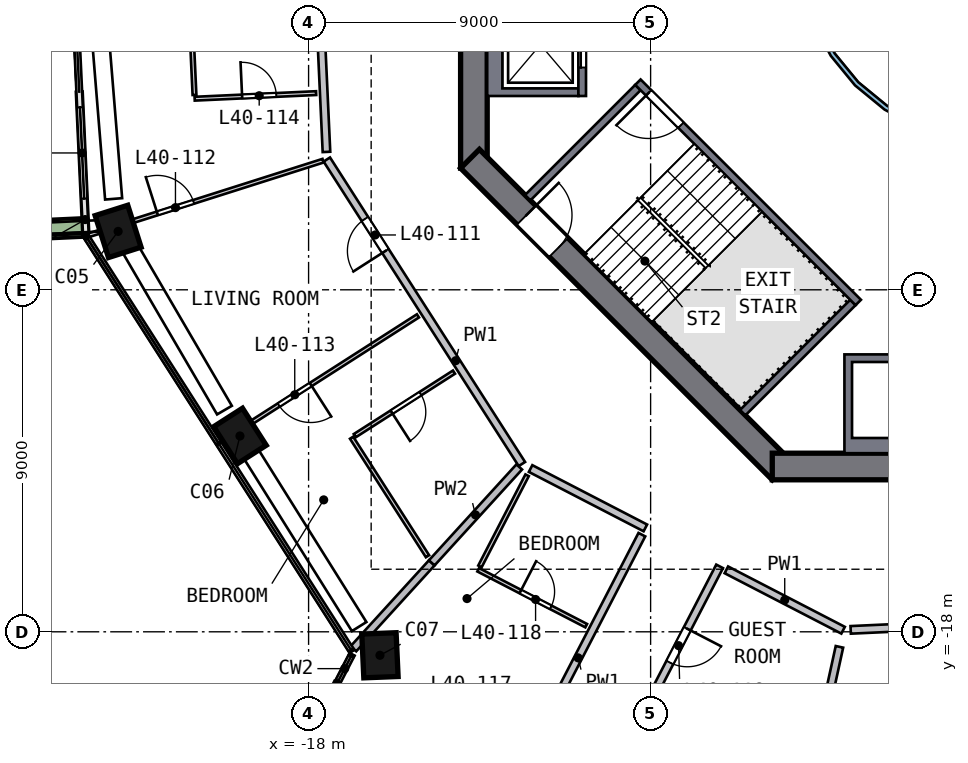
"""IFC4 building model, lengths in metres.
Left out: names, types, materials, properties, quantities, classifications, styles, units other than length and angle.
Written with IfcOpenShell. Run it as: python <this file> out.ifc"""

import sys

from ifc_helpers import new_model, si_unit, direction, frame, frame_2d, origin, origin_2d, place, context, subcontext, project, spatial, polyline, rectangle, outline, extrude, element, fill, save


model = new_model("IFC4")
c1 = context("Model", 3, precision=1e-05, world=origin(), true_north=direction((0.0, 1.0)))
c2 = subcontext(c1, "Body", "Model", "MODEL_VIEW")
j1 = project(units=[si_unit("LENGTHUNIT", "METRE"), si_unit("PLANEANGLEUNIT", "RADIAN")], contexts=[c1])
p1 = place(None, origin())
s1 = spatial("IfcSite", under=j1, at=p1, CompositionType="ELEMENT")
p2 = place(p1, origin())
s2 = spatial("IfcBuilding", under=s1, at=p2, CompositionType="ELEMENT")
p3 = place(p2, frame((0.0, 0.0, 165.5)))
s3 = spatial("IfcBuildingStorey", under=s2, at=p3, CompositionType="ELEMENT", Elevation=165.5)
p4 = place(p3, frame((-23.055, -7.331, 0.0), z_axis=(0.035812192, -0.109295901, 0.993363928), x_axis=(-0.301282406, 0.946573687, 0.115009418)))
e1 = element("IfcColumn", 1, at=p4, inside=s3, PredefinedType="COLUMN", context=c2, shape_type="SweptSolid", body=[
    extrude(rectangle(XDim=1.15, YDim=0.9, at=origin_2d()), origin(), (0.0, 0.0, 1.0), 3.02),
])
p5 = place(p3, frame((-19.88, -12.733, 0.0), z_axis=(0.061296279, -0.094046929, 0.993678993), x_axis=(0.535491613, -0.837046934, -0.112254901)))
e2 = element("IfcColumn", 2, at=p5, inside=s3, PredefinedType="COLUMN", context=c2, shape_type="SweptSolid", body=[
    extrude(rectangle(XDim=1.15, YDim=0.9, at=origin_2d()), origin(), (0.0, 0.0, 1.0), 3.019),
])
p6 = place(p3, frame((-16.229, -18.525, 0.0), z_axis=(0.088740358, -0.076455719, 0.993116142), x_axis=(-0.038931271, 0.996021602, 0.080158119)))
e3 = element("IfcColumn", 3, at=p6, inside=s3, PredefinedType="COLUMN", context=c2, shape_type="SweptSolid", body=[
    extrude(rectangle(XDim=1.15, YDim=0.9, at=origin_2d()), origin(), (0.0, 0.0, 1.0), 3.021),
])
p7 = place(p3, frame((-13.65, 5.799, 0.0), z_axis=(0.0, 0.0, 1.0), x_axis=(0.0, -1.0, 0.0)))
e4 = element("IfcWall", 4, at=p7, inside=s3, PredefinedType="SHEAR", context=c2, shape_type="SweptSolid", body=[
    extrude(rectangle(XDim=11.598, YDim=0.7, at=frame_2d((5.799, 0.0))), origin(), (0.0, 0.0, 1.0), 3.5),
])
p8 = place(p7, frame((4.899, 0.0, 0.0)))
e5 = element("IfcOpeningElement", 5, at=p8, cuts=e4, PredefinedType="OPENING", context=c2, shape_type="SweptSolid", body=[
    extrude(rectangle(XDim=1.8, YDim=2.1, at=frame_2d((0.9, 1.05))), frame((0.0, 0.36, 0.0), z_axis=(0.0, -1.0, 0.0), x_axis=(1.0, 0.0, 0.0)), (0.0, 0.0, 1.0), 0.72),
])
p9 = place(p3, frame((-13.752, -5.552, 0.0), z_axis=(0.0, 0.0, 1.0), x_axis=(0.707106781, -0.707106781, 0.0)))
e6 = element("IfcWall", 6, at=p9, inside=s3, PredefinedType="SHEAR", context=c2, shape_type="SweptSolid", body=[
    extrude(rectangle(XDim=11.598, YDim=0.7, at=frame_2d((5.799, 0.0))), origin(), (0.0, 0.0, 1.0), 3.5),
])
p10 = place(p9, frame((2.099, 0.0, 0.0)))
e7 = element("IfcOpeningElement", 7, at=p10, cuts=e6, PredefinedType="OPENING", context=c2, shape_type="SweptSolid", body=[
    extrude(rectangle(XDim=1.2, YDim=2.1, at=frame_2d((0.6, 1.05))), frame((0.0, 0.36, 0.0), z_axis=(0.0, -1.0, 0.0), x_axis=(1.0, 0.0, 0.0)), (0.0, 0.0, 1.0), 0.72),
])
p11 = place(p3, frame((-5.799, -13.65, 0.0), z_axis=(0.0, 0.0, 1.0), x_axis=(1.0, 0.0, 0.0)))
e8 = element("IfcWall", 8, at=p11, inside=s3, PredefinedType="SHEAR", context=c2, shape_type="SweptSolid", body=[
    extrude(rectangle(XDim=11.598, YDim=0.7, at=frame_2d((5.799, 0.0))), origin(), (0.0, 0.0, 1.0), 3.5),
])
p12 = place(p11, frame((4.899, 0.0, 0.0)))
e9 = element("IfcOpeningElement", 9, at=p12, cuts=e8, PredefinedType="OPENING", context=c2, shape_type="SweptSolid", body=[
    extrude(rectangle(XDim=1.8, YDim=2.1, at=frame_2d((0.9, 1.05))), frame((0.0, 0.36, 0.0), z_axis=(0.0, -1.0, 0.0), x_axis=(1.0, 0.0, 0.0)), (0.0, 0.0, 1.0), 0.72),
])
p13 = place(p3, frame((-17.347, -19.379, 0.0), z_axis=(0.0, 0.0, 1.0), x_axis=(0.888116855, -0.459617724, 0.0)))
e10 = element("IfcWall", 10, at=p13, inside=s3, PredefinedType="SOLIDWALL", context=c2, shape_type="SweptSolid", body=[
    extrude(rectangle(XDim=1.875, YDim=0.15, at=frame_2d((0.938, 0.0))), origin(), (0.0, 0.0, 1.0), 3.0),
])
p14 = place(p3, frame((-24.034, -3.801, 0.0), z_axis=(0.0, 0.0, 1.0), x_axis=(0.046064357, -0.998938474, 0.0)))
e11 = element("IfcWall", 11, at=p14, inside=s3, PredefinedType="SOLIDWALL", context=c2, shape_type="SweptSolid", body=[
    extrude(rectangle(XDim=3.71, YDim=0.15, at=frame_2d((1.855, 0.0))), origin(), (0.0, 0.0, 1.0), 2.935),
])
p15 = place(p14, frame((0.4, 0.0, 0.0)))
e12 = element("IfcOpeningElement", 12, at=p15, cuts=e11, PredefinedType="OPENING", context=c2, shape_type="SweptSolid", body=[
    extrude(rectangle(XDim=2.4, YDim=2.4, at=frame_2d((1.2, 1.2))), frame((0.0, 0.085, 0.0), z_axis=(0.0, -1.0, 0.0), x_axis=(1.0, 0.0, 0.0)), (0.0, 0.0, 1.0), 0.17),
])
p16 = place(p3, frame((-26.642, -7.485, 0.0), z_axis=(0.0, 0.0, 1.0), x_axis=(0.998939428, 0.046043663, 0.0)))
e13 = element("IfcWall", 13, at=p16, inside=s3, PredefinedType="SOLIDWALL", context=c2, shape_type="SweptSolid", body=[
    extrude(rectangle(XDim=2.699, YDim=0.5, at=frame_2d((1.35, 0.0))), origin(), (0.0, 0.0, 1.0), 0.7),
])
p17 = place(p3, origin())
e14 = element("IfcWall", 14, at=p17, inside=s3, PredefinedType="SOLIDWALL", context=c2, shape_type="SweptSolid", body=[
    extrude(outline(polyline([(-13.3, -3.9), (-13.3, -1.2), (-10.9, -1.2), (-10.9, -1.4), (-12.9, -1.4), (-12.9, -3.7), (-10.9, -3.7), (-10.9, -3.9), (-13.3, -3.9)])), origin(), (0.0, 0.0, 1.0), 3.0),
])
p18 = place(p3, frame((-10.8, -1.2, 0.0), z_axis=(0.0, 0.0, 1.0), x_axis=(0.0, -1.0, 0.0)))
e15 = element("IfcWall", 15, at=p18, inside=s3, PredefinedType="SOLIDWALL", context=c2, shape_type="SweptSolid", body=[
    extrude(rectangle(XDim=2.7, YDim=0.2, at=frame_2d((1.35, 0.0))), origin(), (0.0, 0.0, 1.0), 3.0),
])
p19 = place(p18, frame((0.75, 0.0, 0.0)))
e16 = element("IfcOpeningElement", 16, at=p19, cuts=e15, PredefinedType="OPENING", context=c2, shape_type="SweptSolid", body=[
    extrude(rectangle(XDim=1.2, YDim=2.1, at=frame_2d((0.6, 1.05))), frame((0.0, 0.11, 0.0), z_axis=(0.0, -1.0, 0.0), x_axis=(1.0, 0.0, 0.0)), (0.0, 0.0, 1.0), 0.22),
])
p20 = place(p3, origin())
e17 = element("IfcWall", 17, at=p20, inside=s3, PredefinedType="SOLIDWALL", context=c2, shape_type="SweptSolid", body=[
    extrude(outline(polyline([(-1.2, -13.3), (-3.9, -13.3), (-3.9, -10.7), (-1.2, -10.7), (-1.2, -13.3)]), holes=[polyline([(-3.7, -10.9), (-3.7, -12.9), (-1.4, -12.9), (-1.4, -10.9), (-3.7, -10.9)])]), origin(), (0.0, 0.0, 1.0), 3.0),
])
p21 = place(p3, frame((-3.535, -9.334, 0.0), z_axis=(0.0, 0.0, 1.0), x_axis=(-0.707106781, 0.707106781, 0.0)))
e18 = element("IfcWall", 18, at=p21, inside=s3, PredefinedType="SOLIDWALL", context=c2, shape_type="SweptSolid", body=[
    extrude(rectangle(XDim=8.2, YDim=0.2, at=frame_2d((4.1, 0.0))), origin(), (0.0, 0.0, 1.0), 3.0),
])
p22 = place(p21, frame((6.6, 0.0, 0.0)))
e19 = element("IfcOpeningElement", 19, at=p22, cuts=e18, PredefinedType="OPENING", context=c2, shape_type="SweptSolid", body=[
    extrude(rectangle(XDim=1.2, YDim=2.1, at=frame_2d((0.6, 1.05))), frame((0.0, 0.11, 0.0), z_axis=(0.0, -1.0, 0.0), x_axis=(1.0, 0.0, 0.0)), (0.0, 0.0, 1.0), 0.22),
])
for number, where, z_axis, x_axis in (
    (20, (-9.334, -3.677, 0.0), (0.0, 0.0, 1.0), (-0.707, -0.707, 0.0)),
    (21, (-3.677, -9.334, 0.0), (0.0, 0.0, 1.0), (-0.707, -0.707, 0.0)),
):
    element("IfcWall", number, at=place(p3, frame(where, z_axis=z_axis, x_axis=x_axis)), inside=s3, PredefinedType="SOLIDWALL", context=c2, shape_type="SweptSolid", body=[
        extrude(rectangle(XDim=4.1, YDim=0.2, at=frame_2d((2.05, 0.0))), origin(), (0.0, 0.0, 1.0), 3.0),
    ])
p23 = place(p3, origin())
e22 = element("IfcWall", 22, at=p23, inside=s3, PredefinedType="SOLIDWALL", context=c2, shape_type="SweptSolid", body=[
    extrude(outline(polyline([(5.021, -0.999), (4.73, -1.959), (4.257, -2.844), (3.62, -3.62), (2.844, -4.257), (1.959, -4.73), (0.999, -5.021), (0.0, -5.12), (-0.999, -5.021), (-1.959, -4.73), (-2.844, -4.257), (-3.62, -3.62), (-4.257, -2.844), (-4.73, -1.959), (-5.021, -0.999), (-5.12, 0.0), (-5.021, 0.999), (-4.73, 1.959), (-4.257, 2.844), (-3.62, 3.62), (-2.844, 4.257), (-1.959, 4.73), (-0.999, 5.021), (0.0, 5.12), (0.999, 5.021), (1.959, 4.73), (2.844, 4.257), (3.62, 3.62), (4.257, 2.844), (4.73, 1.959), (5.021, 0.999), (5.12, 0.0), (5.021, -0.999)]), holes=[polyline([(4.904, 0.976), (4.619, 1.913), (4.157, 2.778), (3.535, 3.535), (2.778, 4.157), (1.913, 4.619), (0.976, 4.904), (0.0, 5.0), (-0.976, 4.904), (-1.913, 4.619), (-2.778, 4.157), (-3.535, 3.535), (-4.157, 2.778), (-4.619, 1.913), (-4.904, 0.976), (-5.0, 0.0), (-4.904, -0.976), (-4.619, -1.913), (-4.157, -2.778), (-3.535, -3.535), (-2.778, -4.157), (-1.913, -4.619), (-0.976, -4.904), (0.0, -5.0), (0.976, -4.904), (1.913, -4.619), (2.778, -4.157), (3.535, -3.535), (4.157, -2.778), (4.619, -1.913), (4.904, -0.976), (5.0, 0.0), (4.904, 0.976)])]), origin(), (0.0, 0.0, 1.0), 3.0),
])
p24 = place(p3, frame((-17.949, 3.736, 0.0), z_axis=(0.0, 0.0, 1.0), x_axis=(0.046061188, -0.99893862, 0.0)))
e23 = element("IfcWall", 23, at=p24, inside=s3, PredefinedType="SOLIDWALL", context=c2, shape_type="SweptSolid", body=[
    extrude(rectangle(XDim=9.117, YDim=0.2, at=frame_2d((4.558, 0.0))), origin(), (0.0, 0.0, 1.0), 3.0),
])
p25 = place(p3, frame((-12.387, -13.585, 0.0), z_axis=(0.0, 0.0, 1.0), x_axis=(-0.539356505, 0.842077526, 0.0)))
e24 = element("IfcWall", 24, at=p25, inside=s3, PredefinedType="SOLIDWALL", context=c2, shape_type="SweptSolid", body=[
    extrude(rectangle(XDim=9.517, YDim=0.2, at=frame_2d((4.758, 0.0))), origin(), (0.0, 0.0, 1.0), 3.0),
])
p26 = place(p25, frame((6.658, 0.0, 0.0)))
e25 = element("IfcOpeningElement", 25, at=p26, cuts=e24, PredefinedType="OPENING", context=c2, shape_type="SweptSolid", body=[
    extrude(rectangle(XDim=1.0, YDim=2.1, at=frame_2d((0.5, 1.05))), frame((0.0, 0.11, 0.0), z_axis=(0.0, -1.0, 0.0), x_axis=(1.0, 0.0, 0.0)), (0.0, 0.0, 1.0), 0.22),
])
p27 = place(p3, frame((-9.23, -15.444, 0.0), z_axis=(0.0, 0.0, 1.0), x_axis=(-0.45958486, -0.888133862, 0.0)))
e26 = element("IfcWall", 26, at=p27, inside=s3, PredefinedType="SOLIDWALL", context=c2, shape_type="SweptSolid", body=[
    extrude(rectangle(XDim=7.3, YDim=0.2, at=frame_2d((3.65, 0.0))), origin(), (0.0, 0.0, 1.0), 3.0),
])
p28 = place(p3, frame((-12.158, -13.704, 0.0), z_axis=(0.0, 0.0, 1.0), x_axis=(0.888122651, -0.459606524, 0.0)))
e27 = element("IfcWall", 27, at=p28, inside=s3, PredefinedType="SOLIDWALL", context=c2, shape_type="SweptSolid", body=[
    extrude(rectangle(XDim=3.4, YDim=0.2, at=frame_2d((1.7, 0.0))), origin(), (0.0, 0.0, 1.0), 3.0),
])
p29 = place(p3, frame((-7.184, -16.277, 0.0), z_axis=(0.0, 0.0, 1.0), x_axis=(-0.459592049, -0.888130142, 0.0)))
e28 = element("IfcWall", 28, at=p29, inside=s3, PredefinedType="SOLIDWALL", context=c2, shape_type="SweptSolid", body=[
    extrude(rectangle(XDim=7.5, YDim=0.2, at=frame_2d((3.75, 0.0))), origin(), (0.0, 0.0, 1.0), 3.0),
])
p30 = place(p29, frame((1.85, 0.0, 0.0)))
e29 = element("IfcOpeningElement", 29, at=p30, cuts=e28, PredefinedType="OPENING", context=c2, shape_type="SweptSolid", body=[
    extrude(rectangle(XDim=1.0, YDim=2.1, at=frame_2d((0.5, 1.05))), frame((0.0, 0.11, 0.0), z_axis=(0.0, -1.0, 0.0), x_axis=(1.0, 0.0, 0.0)), (0.0, 0.0, 1.0), 0.22),
])
p31 = place(p3, frame((-7.007, -16.369, 0.0), z_axis=(0.0, 0.0, 1.0), x_axis=(0.88814313, -0.459566948, 0.0)))
e30 = element("IfcWall", 30, at=p31, inside=s3, PredefinedType="SOLIDWALL", context=c2, shape_type="SweptSolid", body=[
    extrude(rectangle(XDim=3.458, YDim=0.2, at=frame_2d((1.729, 0.0))), origin(), (0.0, 0.0, 1.0), 3.0),
])
p32 = place(p3, frame((5.571, -17.52, 0.0), z_axis=(0.0, 0.0, 1.0), x_axis=(-0.998938225, -0.046069766, 0.0)))
e31 = element("IfcWall", 31, at=p32, inside=s3, PredefinedType="SOLIDWALL", context=c2, shape_type="SweptSolid", body=[
    extrude(rectangle(XDim=9.316, YDim=0.2, at=frame_2d((4.658, 0.0))), origin(), (0.0, 0.0, 1.0), 3.0),
])
p33 = place(p32, frame((5.15, 0.0, 0.0)))
e32 = element("IfcOpeningElement", 32, at=p33, cuts=e31, PredefinedType="OPENING", context=c2, shape_type="SweptSolid", body=[
    extrude(rectangle(XDim=1.0, YDim=2.1, at=frame_2d((0.5, 1.05))), frame((0.0, 0.11, 0.0), z_axis=(0.0, -1.0, 0.0), x_axis=(1.0, 0.0, 0.0)), (0.0, 0.0, 1.0), 0.22),
])
p34 = place(p3, frame((-14.759, -16.186, 0.0), z_axis=(0.0, 0.0, 1.0), x_axis=(-0.673839723, -0.738877546, 0.0)))
e33 = element("IfcWall", 33, at=p34, inside=s3, PredefinedType="SOLIDWALL", context=c2, shape_type="SweptSolid", body=[
    extrude(rectangle(XDim=3.059, YDim=0.2, at=frame_2d((1.53, 0.0))), origin(), (0.0, 0.0, 1.0), 3.0),
])
p35 = place(p3, frame((-12.457, -13.662, 0.0), z_axis=(0.0, 0.0, 1.0), x_axis=(-0.673767631, -0.738943286, 0.0)))
e34 = element("IfcWall", 34, at=p35, inside=s3, PredefinedType="SOLIDWALL", context=c2, shape_type="SweptSolid", body=[
    extrude(rectangle(XDim=3.416, YDim=0.2, at=frame_2d((1.708, 0.0))), origin(), (0.0, 0.0, 1.0), 3.0),
])
p36 = place(p3, frame((-4.031, -18.396, 0.0), z_axis=(0.0, 0.0, 1.0), x_axis=(-0.214071013, -0.976818101, 0.0)))
e35 = element("IfcWall", 35, at=p36, inside=s3, PredefinedType="SOLIDWALL", context=c2, shape_type="SweptSolid", body=[
    extrude(rectangle(XDim=3.075, YDim=0.2, at=frame_2d((1.537, 0.0))), origin(), (0.0, 0.0, 1.0), 3.0),
])
p37 = place(p3, frame((-21.127, -1.174, 0.0), z_axis=(0.0, 0.0, 1.0), x_axis=(0.046113095, -0.998936225, 0.0)))
e36 = element("IfcWall", 36, at=p37, inside=s3, PredefinedType="PARTITIONING", context=c2, shape_type="SweptSolid", body=[
    extrude(rectangle(XDim=2.7, YDim=0.1, at=frame_2d((1.35, 0.0))), origin(), (0.0, 0.0, 1.0), 3.0),
])
p38 = place(p3, frame((-23.79, -7.565, 0.0), z_axis=(0.0, 0.0, 1.0), x_axis=(0.952980228, 0.303032482, 0.0)))
e37 = element("IfcWall", 37, at=p38, inside=s3, PredefinedType="PARTITIONING", context=c2, shape_type="SweptSolid", body=[
    extrude(rectangle(XDim=6.476, YDim=0.1, at=frame_2d((3.238, 0.0))), origin(), (0.0, 0.0, 1.0), 3.0),
])
p39 = place(p38, frame((1.9, 0.0, 0.0)))
e38 = element("IfcOpeningElement", 38, at=p39, cuts=e37, PredefinedType="OPENING", context=c2, shape_type="SweptSolid", body=[
    extrude(rectangle(XDim=1.0, YDim=2.1, at=frame_2d((0.5, 1.05))), frame((0.0, 0.06, 0.0), z_axis=(0.0, -1.0, 0.0), x_axis=(1.0, 0.0, 0.0)), (0.0, 0.0, 1.0), 0.12),
])
p40 = place(p3, frame((-20.998, -3.971, 0.0), z_axis=(0.0, 0.0, 1.0), x_axis=(0.998937799, 0.046079, 0.0)))
e39 = element("IfcWall", 39, at=p40, inside=s3, PredefinedType="PARTITIONING", context=c2, shape_type="SweptSolid", body=[
    extrude(rectangle(XDim=3.2, YDim=0.1, at=frame_2d((1.6, 0.0))), origin(), (0.0, 0.0, 1.0), 3.0),
])
p41 = place(p40, frame((1.25, 0.0, 0.0)))
e40 = element("IfcOpeningElement", 40, at=p41, cuts=e39, PredefinedType="OPENING", context=c2, shape_type="SweptSolid", body=[
    extrude(rectangle(XDim=0.9, YDim=2.1, at=frame_2d((0.45, 1.05))), frame((0.0, 0.06, 0.0), z_axis=(0.0, -1.0, 0.0), x_axis=(1.0, 0.0, 0.0)), (0.0, 0.0, 1.0), 0.12),
])
p42 = place(p3, frame((-15.122, -9.686, 0.0), z_axis=(0.0, 0.0, 1.0), x_axis=(-0.84208534, -0.539344306, 0.0)))
e41 = element("IfcWall", 41, at=p42, inside=s3, PredefinedType="PARTITIONING", context=c2, shape_type="SweptSolid", body=[
    extrude(rectangle(XDim=6.15, YDim=0.1, at=frame_2d((3.075, 0.0))), origin(), (0.0, 0.0, 1.0), 3.0),
])
p43 = place(p42, frame((3.35, 0.0, 0.0)))
e42 = element("IfcOpeningElement", 42, at=p43, cuts=e41, PredefinedType="OPENING", context=c2, shape_type="SweptSolid", body=[
    extrude(rectangle(XDim=1.0, YDim=2.1, at=frame_2d((0.5, 1.05))), frame((0.0, 0.06, 0.0), z_axis=(0.0, -1.0, 0.0), x_axis=(1.0, 0.0, 0.0)), (0.0, 0.0, 1.0), 0.12),
])
p44 = place(p3, frame((-16.869, -12.893, 0.0), z_axis=(0.0, 0.0, 1.0), x_axis=(0.539351049, -0.842081021, 0.0)))
e43 = element("IfcWall", 43, at=p44, inside=s3, PredefinedType="PARTITIONING", context=c2, shape_type="SweptSolid", body=[
    extrude(rectangle(XDim=3.704, YDim=0.1, at=frame_2d((1.852, 0.0))), origin(), (0.0, 0.0, 1.0), 3.0),
])
p45 = place(p3, frame((-14.174, -11.167, 0.0), z_axis=(0.0, 0.0, 1.0), x_axis=(-0.842052497, -0.539395581, 0.0)))
e44 = element("IfcWall", 44, at=p45, inside=s3, PredefinedType="PARTITIONING", context=c2, shape_type="SweptSolid", body=[
    extrude(rectangle(XDim=3.1, YDim=0.1, at=frame_2d((1.55, 0.0))), origin(), (0.0, 0.0, 1.0), 3.0),
])
p46 = place(p45, frame((1.05, 0.0, 0.0)))
e45 = element("IfcOpeningElement", 45, at=p46, cuts=e44, PredefinedType="OPENING", context=c2, shape_type="SweptSolid", body=[
    extrude(rectangle(XDim=0.9, YDim=2.1, at=frame_2d((0.45, 1.05))), frame((0.0, 0.06, 0.0), z_axis=(0.0, -1.0, 0.0), x_axis=(1.0, 0.0, 0.0)), (0.0, 0.0, 1.0), 0.12),
])
p47 = place(p3, frame((-12.25, -13.881, 0.0), z_axis=(0.0, 0.0, 1.0), x_axis=(-0.459540994, -0.88815656, 0.0)))
e46 = element("IfcWall", 46, at=p47, inside=s3, PredefinedType="PARTITIONING", context=c2, shape_type="SweptSolid", body=[
    extrude(rectangle(XDim=2.7, YDim=0.1, at=frame_2d((1.35, 0.0))), origin(), (0.0, 0.0, 1.0), 3.0),
])
p48 = place(p3, frame((-13.537, -16.368, 0.0), z_axis=(0.0, 0.0, 1.0), x_axis=(0.88813067, -0.459591028, 0.0)))
e47 = element("IfcWall", 47, at=p48, inside=s3, PredefinedType="PARTITIONING", context=c2, shape_type="SweptSolid", body=[
    extrude(rectangle(XDim=3.2, YDim=0.1, at=frame_2d((1.6, 0.0))), origin(), (0.0, 0.0, 1.0), 3.0),
])
p49 = place(p48, frame((1.25, 0.0, 0.0)))
e48 = element("IfcOpeningElement", 48, at=p49, cuts=e47, PredefinedType="OPENING", context=c2, shape_type="SweptSolid", body=[
    extrude(rectangle(XDim=0.9, YDim=2.1, at=frame_2d((0.45, 1.05))), frame((0.0, 0.06, 0.0), z_axis=(0.0, -1.0, 0.0), x_axis=(1.0, 0.0, 0.0)), (0.0, 0.0, 1.0), 0.12),
])
p50 = place(p15, origin())
e49 = element("IfcDoor", 49, at=p50, inside=s3, OperationType="SLIDING_TO_RIGHT", PredefinedType="DOOR", context=c2, shape_type="SweptSolid", body=[
    extrude(rectangle(XDim=2.4, YDim=2.4, at=frame_2d((1.2, 1.2))), frame((0.0, 0.025, 0.0), z_axis=(0.0, -1.0, 0.0), x_axis=(1.0, 0.0, 0.0)), (0.0, 0.0, 1.0), 0.05),
])
fill(e12, e49)
p51 = place(p19, origin())
e50 = element("IfcDoor", 50, at=p51, inside=s3, OperationType="DOUBLE_DOOR_SLIDING", PredefinedType="DOOR", context=c2, shape_type="SweptSolid", body=[
    extrude(rectangle(XDim=1.2, YDim=2.1, at=frame_2d((0.6, 1.05))), frame((0.0, 0.025, 0.0), z_axis=(0.0, -1.0, 0.0), x_axis=(1.0, 0.0, 0.0)), (0.0, 0.0, 1.0), 0.05),
])
fill(e16, e50)
p52 = place(p22, origin())
e51 = element("IfcDoor", 51, at=p52, inside=s3, OperationType="SINGLE_SWING_RIGHT", PredefinedType="DOOR", context=c2, shape_type="SweptSolid", body=[
    extrude(rectangle(XDim=1.2, YDim=2.1, at=frame_2d((0.6, 1.05))), frame((0.0, 0.025, 0.0), z_axis=(0.0, -1.0, 0.0), x_axis=(1.0, 0.0, 0.0)), (0.0, 0.0, 1.0), 0.05),
])
fill(e19, e51)
p53 = place(p10, origin())
e52 = element("IfcDoor", 52, at=p53, inside=s3, OperationType="SINGLE_SWING_LEFT", PredefinedType="DOOR", context=c2, shape_type="SweptSolid", body=[
    extrude(rectangle(XDim=1.2, YDim=2.1, at=frame_2d((0.6, 1.05))), frame((0.0, 0.025, 0.0), z_axis=(0.0, -1.0, 0.0), x_axis=(1.0, 0.0, 0.0)), (0.0, 0.0, 1.0), 0.05),
])
fill(e7, e52)
p54 = place(p26, origin())
e53 = element("IfcDoor", 53, at=p54, inside=s3, OperationType="SINGLE_SWING_LEFT", PredefinedType="DOOR", context=c2, shape_type="SweptSolid", body=[
    extrude(rectangle(XDim=1.0, YDim=2.1, at=frame_2d((0.5, 1.05))), frame((0.0, 0.025, 0.0), z_axis=(0.0, -1.0, 0.0), x_axis=(1.0, 0.0, 0.0)), (0.0, 0.0, 1.0), 0.05),
])
fill(e25, e53)
p55 = place(p39, origin())
e54 = element("IfcDoor", 54, at=p55, inside=s3, OperationType="SINGLE_SWING_LEFT", PredefinedType="DOOR", context=c2, shape_type="SweptSolid", body=[
    extrude(rectangle(XDim=1.0, YDim=2.1, at=frame_2d((0.5, 1.05))), frame((0.0, 0.025, 0.0), z_axis=(0.0, -1.0, 0.0), x_axis=(1.0, 0.0, 0.0)), (0.0, 0.0, 1.0), 0.05),
])
fill(e38, e54)
p56 = place(p43, origin())
e55 = element("IfcDoor", 55, at=p56, inside=s3, OperationType="SINGLE_SWING_LEFT", PredefinedType="DOOR", context=c2, shape_type="SweptSolid", body=[
    extrude(rectangle(XDim=1.0, YDim=2.1, at=frame_2d((0.5, 1.05))), frame((0.0, 0.025, 0.0), z_axis=(0.0, -1.0, 0.0), x_axis=(1.0, 0.0, 0.0)), (0.0, 0.0, 1.0), 0.05),
])
fill(e42, e55)
p57 = place(p41, origin())
e56 = element("IfcDoor", 56, at=p57, inside=s3, OperationType="SINGLE_SWING_LEFT", PredefinedType="DOOR", context=c2, shape_type="SweptSolid", body=[
    extrude(rectangle(XDim=0.9, YDim=2.1, at=frame_2d((0.45, 1.05))), frame((0.0, 0.025, 0.0), z_axis=(0.0, -1.0, 0.0), x_axis=(1.0, 0.0, 0.0)), (0.0, 0.0, 1.0), 0.05),
])
fill(e40, e56)
p58 = place(p46, origin())
e57 = element("IfcDoor", 57, at=p58, inside=s3, OperationType="SINGLE_SWING_RIGHT", PredefinedType="DOOR", context=c2, shape_type="SweptSolid", body=[
    extrude(rectangle(XDim=0.9, YDim=2.1, at=frame_2d((0.45, 1.05))), frame((0.0, 0.025, 0.0), z_axis=(0.0, -1.0, 0.0), x_axis=(1.0, 0.0, 0.0)), (0.0, 0.0, 1.0), 0.05),
])
fill(e45, e57)
p59 = place(p49, origin())
e58 = element("IfcDoor", 58, at=p59, inside=s3, OperationType="SINGLE_SWING_LEFT", PredefinedType="DOOR", context=c2, shape_type="SweptSolid", body=[
    extrude(rectangle(XDim=0.9, YDim=2.1, at=frame_2d((0.45, 1.05))), frame((0.0, 0.025, 0.0), z_axis=(0.0, -1.0, 0.0), x_axis=(1.0, 0.0, 0.0)), (0.0, 0.0, 1.0), 0.05),
])
fill(e48, e58)
p60 = place(p30, origin())
e59 = element("IfcDoor", 59, at=p60, inside=s3, OperationType="SINGLE_SWING_LEFT", PredefinedType="DOOR", context=c2, shape_type="SweptSolid", body=[
    extrude(rectangle(XDim=1.0, YDim=2.1, at=frame_2d((0.5, 1.05))), frame((0.0, 0.025, 0.0), z_axis=(0.0, -1.0, 0.0), x_axis=(1.0, 0.0, 0.0)), (0.0, 0.0, 1.0), 0.05),
])
fill(e29, e59)
save(model, sys.argv[1])
